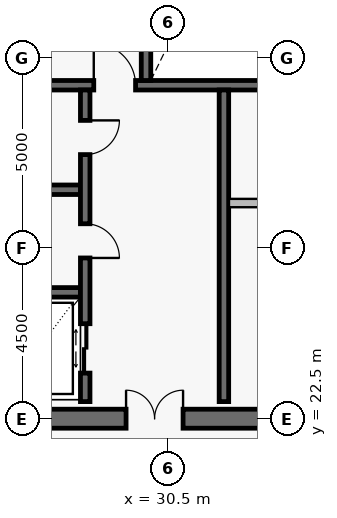
"""IFC4 building model, lengths in metres.
Left out: names, types, materials, properties, quantities, classifications, styles, units other than length and angle.
Written with IfcOpenShell. Run it as: python <this file> out.ifc"""

import sys

from ifc_helpers import new_model, si_unit, direction, frame, frame_2d, origin, place, context, subcontext, project, spatial, rectangle, extrude, element, fill, save


model = new_model("IFC4")
c1 = context("Model", 3, precision=1e-05, world=origin(), true_north=direction((0.0, 1.0)))
c2 = subcontext(c1, "Body", "Model", "MODEL_VIEW")
j1 = project(units=[si_unit("LENGTHUNIT", "METRE"), si_unit("PLANEANGLEUNIT", "RADIAN")], contexts=[c1])
p1 = place(None, origin())
s1 = spatial("IfcSite", under=j1, at=p1, CompositionType="ELEMENT")
p2 = place(p1, origin())
s2 = spatial("IfcBuilding", under=s1, at=p2, CompositionType="ELEMENT")
p3 = place(p2, frame((0.0, 0.0, 308.2)))
s3 = spatial("IfcBuildingStorey", under=s2, at=p3, CompositionType="ELEMENT", Elevation=308.2)
p4 = place(p3, frame((25.25, 22.5, 0.0), z_axis=(0.0, 0.0, 1.0), x_axis=(1.0, 0.0, 0.0)))
e1 = element("IfcWall", 1, at=p4, inside=s3, PredefinedType="SHEAR", context=c2, shape_type="SweptSolid", body=[
    extrude(rectangle(XDim=9.8, YDim=0.5, at=frame_2d((4.9, 0.0))), origin(), (0.0, 0.0, 1.0), 3.8),
])
p5 = place(p4, frame((4.15, 0.0, 0.0)))
e2 = element("IfcOpeningElement", 2, at=p5, cuts=e1, PredefinedType="OPENING", context=c2, shape_type="SweptSolid", body=[
    extrude(rectangle(XDim=1.5, YDim=2.15, at=frame_2d((0.75, 1.075))), frame((0.0, 0.262, 0.0), z_axis=(0.0, -1.0, 0.0), x_axis=(1.0, 0.0, 0.0)), (0.0, 0.0, 1.0), 0.524),
])
p6 = place(p3, frame((25.95, 31.275, 0.0), z_axis=(0.0, 0.0, 1.0), x_axis=(1.0, 0.0, 0.0)))
e3 = element("IfcWall", 3, at=p6, inside=s3, PredefinedType="SOLIDWALL", context=c2, shape_type="SweptSolid", body=[
    extrude(rectangle(XDim=20.1, YDim=0.25, at=frame_2d((10.05, 0.0))), origin(), (0.0, 0.0, 1.0), 3.8),
])
p7 = place(p6, frame((2.6, 0.0, 0.0)))
e4 = element("IfcOpeningElement", 4, at=p7, cuts=e3, PredefinedType="OPENING", context=c2, shape_type="SweptSolid", body=[
    extrude(rectangle(XDim=1.1, YDim=2.15, at=frame_2d((0.55, 1.075))), frame((0.0, 0.137, 0.0), z_axis=(0.0, -1.0, 0.0), x_axis=(1.0, 0.0, 0.0)), (0.0, 0.0, 1.0), 0.274),
])
p8 = place(p6, frame((10.6, 0.0, 0.0)))
e5 = element("IfcOpeningElement", 5, at=p8, cuts=e3, PredefinedType="OPENING", context=c2, shape_type="SweptSolid", body=[
    extrude(rectangle(XDim=1.1, YDim=2.15, at=frame_2d((0.55, 1.075))), frame((0.0, 0.137, 0.0), z_axis=(0.0, -1.0, 0.0), x_axis=(1.0, 0.0, 0.0)), (0.0, 0.0, 1.0), 0.274),
])
p9 = place(p6, frame((16.35, 0.0, 0.0)))
e6 = element("IfcOpeningElement", 6, at=p9, cuts=e3, PredefinedType="OPENING", context=c2, shape_type="SweptSolid", body=[
    extrude(rectangle(XDim=1.1, YDim=2.15, at=frame_2d((0.55, 1.075))), frame((0.0, 0.137, 0.0), z_axis=(0.0, -1.0, 0.0), x_axis=(1.0, 0.0, 0.0)), (0.0, 0.0, 1.0), 0.274),
])
p10 = place(p3, frame((29.925, 31.4, 0.0), z_axis=(0.0, 0.0, 1.0), x_axis=(0.0, 1.0, 0.0)))
e7 = element("IfcWall", 7, at=p10, inside=s3, PredefinedType="SOLIDWALL", context=c2, shape_type="SweptSolid", body=[
    extrude(rectangle(XDim=9.7, YDim=0.25, at=frame_2d((4.85, 0.0))), origin(), (0.0, 0.0, 1.0), 3.8),
])
for number, where, z_axis, x_axis in (
    (8, (25.95, 25.825, 0.0), (0.0, 0.0, 1.0), (1.0, 0.0, 0.0)),
    (9, (25.95, 28.525, 0.0), (0.0, 0.0, 1.0), (1.0, 0.0, 0.0)),
):
    element("IfcWall", number, at=place(p3, frame(where, z_axis=z_axis, x_axis=x_axis)), inside=s3, PredefinedType="SOLIDWALL", context=c2, shape_type="SweptSolid", body=[
        extrude(rectangle(XDim=2.25, YDim=0.25, at=frame_2d((1.125, 0.0))), origin(), (0.0, 0.0, 1.0), 3.8),
    ])
p11 = place(p3, frame((28.325, 22.95, 0.0), z_axis=(0.0, 0.0, 1.0), x_axis=(0.0, 1.0, 0.0)))
e10 = element("IfcWall", 10, at=p11, inside=s3, PredefinedType="SOLIDWALL", context=c2, shape_type="SweptSolid", body=[
    extrude(rectangle(XDim=8.2, YDim=0.25, at=frame_2d((4.1, 0.0))), origin(), (0.0, 0.0, 1.0), 3.8),
])
p12 = place(p11, frame((0.75, 0.0, 0.0)))
e11 = element("IfcOpeningElement", 11, at=p12, cuts=e10, PredefinedType="OPENING", context=c2, shape_type="SweptSolid", body=[
    extrude(rectangle(XDim=1.3, YDim=2.3, at=frame_2d((0.65, 1.15))), frame((0.0, 0.137, 0.0), z_axis=(0.0, -1.0, 0.0), x_axis=(1.0, 0.0, 0.0)), (0.0, 0.0, 1.0), 0.274),
])
p13 = place(p11, frame((3.78, 0.0, 0.0)))
e12 = element("IfcOpeningElement", 12, at=p13, cuts=e10, PredefinedType="OPENING", context=c2, shape_type="SweptSolid", body=[
    extrude(rectangle(XDim=0.9, YDim=2.1, at=frame_2d((0.45, 1.05))), frame((0.0, 0.137, 0.0), z_axis=(0.0, -1.0, 0.0), x_axis=(1.0, 0.0, 0.0)), (0.0, 0.0, 1.0), 0.274),
])
p14 = place(p11, frame((6.5, 0.0, 0.0)))
e13 = element("IfcOpeningElement", 13, at=p14, cuts=e10, PredefinedType="OPENING", context=c2, shape_type="SweptSolid", body=[
    extrude(rectangle(XDim=0.9, YDim=2.1, at=frame_2d((0.45, 1.05))), frame((0.0, 0.137, 0.0), z_axis=(0.0, -1.0, 0.0), x_axis=(1.0, 0.0, 0.0)), (0.0, 0.0, 1.0), 0.274),
])
p15 = place(p3, frame((31.975, 22.95, 0.0), z_axis=(0.0, 0.0, 1.0), x_axis=(0.0, 1.0, 0.0)))
e14 = element("IfcWall", 14, at=p15, inside=s3, PredefinedType="SOLIDWALL", context=c2, shape_type="SweptSolid", body=[
    extrude(rectangle(XDim=8.2, YDim=0.25, at=frame_2d((4.1, 0.0))), origin(), (0.0, 0.0, 1.0), 3.8),
])
p16 = place(p3, frame((32.108, 28.175, 0.0), z_axis=(0.0, 0.0, 1.0), x_axis=(1.0, 0.0, 0.0)))
e15 = element("IfcWall", 15, at=p16, inside=s3, PredefinedType="PARTITIONING", context=c2, shape_type="SweptSolid", body=[
    extrude(rectangle(XDim=2.284, YDim=0.22, at=frame_2d((1.142, 0.0))), origin(), (0.0, 0.0, 1.0), 3.55),
])
p17 = place(p5, origin())
e16 = element("IfcDoor", 16, at=p17, inside=s3, OperationType="DOUBLE_DOOR_SINGLE_SWING", PredefinedType="DOOR", context=c2, shape_type="SweptSolid", body=[
    extrude(rectangle(XDim=1.5, YDim=2.15, at=frame_2d((0.75, 1.075))), frame((0.0, 0.025, 0.0), z_axis=(0.0, -1.0, 0.0), x_axis=(1.0, 0.0, 0.0)), (0.0, 0.0, 1.0), 0.05),
])
fill(e2, e16)
p18 = place(p7, origin())
e17 = element("IfcDoor", 17, at=p18, inside=s3, OperationType="SINGLE_SWING_LEFT", PredefinedType="USERDEFINED", context=c2, shape_type="SweptSolid", body=[
    extrude(rectangle(XDim=1.1, YDim=2.15, at=frame_2d((0.55, 1.075))), frame((0.0, 0.025, 0.0), z_axis=(0.0, -1.0, 0.0), x_axis=(1.0, 0.0, 0.0)), (0.0, 0.0, 1.0), 0.05),
])
fill(e4, e17)
p19 = place(p12, frame((1.3, 0.0, 0.0), z_axis=(0.0, 0.0, 1.0), x_axis=(-1.0, 0.0, 0.0)))
e18 = element("IfcDoor", 18, at=p19, inside=s3, OperationType="DOUBLE_DOOR_SLIDING", PredefinedType="DOOR", context=c2, shape_type="SweptSolid", body=[
    extrude(rectangle(XDim=1.3, YDim=2.3, at=frame_2d((0.65, 1.15))), frame((0.0, 0.025, 0.0), z_axis=(0.0, -1.0, 0.0), x_axis=(1.0, 0.0, 0.0)), (0.0, 0.0, 1.0), 0.05),
])
fill(e11, e18)
p20 = place(p13, frame((0.9, 0.0, 0.0), z_axis=(0.0, 0.0, 1.0), x_axis=(-1.0, 0.0, 0.0)))
e19 = element("IfcDoor", 19, at=p20, inside=s3, OperationType="SINGLE_SWING_RIGHT", PredefinedType="DOOR", context=c2, shape_type="SweptSolid", body=[
    extrude(rectangle(XDim=0.9, YDim=2.1, at=frame_2d((0.45, 1.05))), frame((0.0, 0.025, 0.0), z_axis=(0.0, -1.0, 0.0), x_axis=(1.0, 0.0, 0.0)), (0.0, 0.0, 1.0), 0.05),
])
fill(e12, e19)
p21 = place(p14, frame((0.9, 0.0, 0.0), z_axis=(0.0, 0.0, 1.0), x_axis=(-1.0, 0.0, 0.0)))
e20 = element("IfcDoor", 20, at=p21, inside=s3, OperationType="SINGLE_SWING_LEFT", PredefinedType="DOOR", context=c2, shape_type="SweptSolid", body=[
    extrude(rectangle(XDim=0.9, YDim=2.1, at=frame_2d((0.45, 1.05))), frame((0.0, 0.025, 0.0), z_axis=(0.0, -1.0, 0.0), x_axis=(1.0, 0.0, 0.0)), (0.0, 0.0, 1.0), 0.05),
])
fill(e13, e20)
save(model, sys.argv[1])
